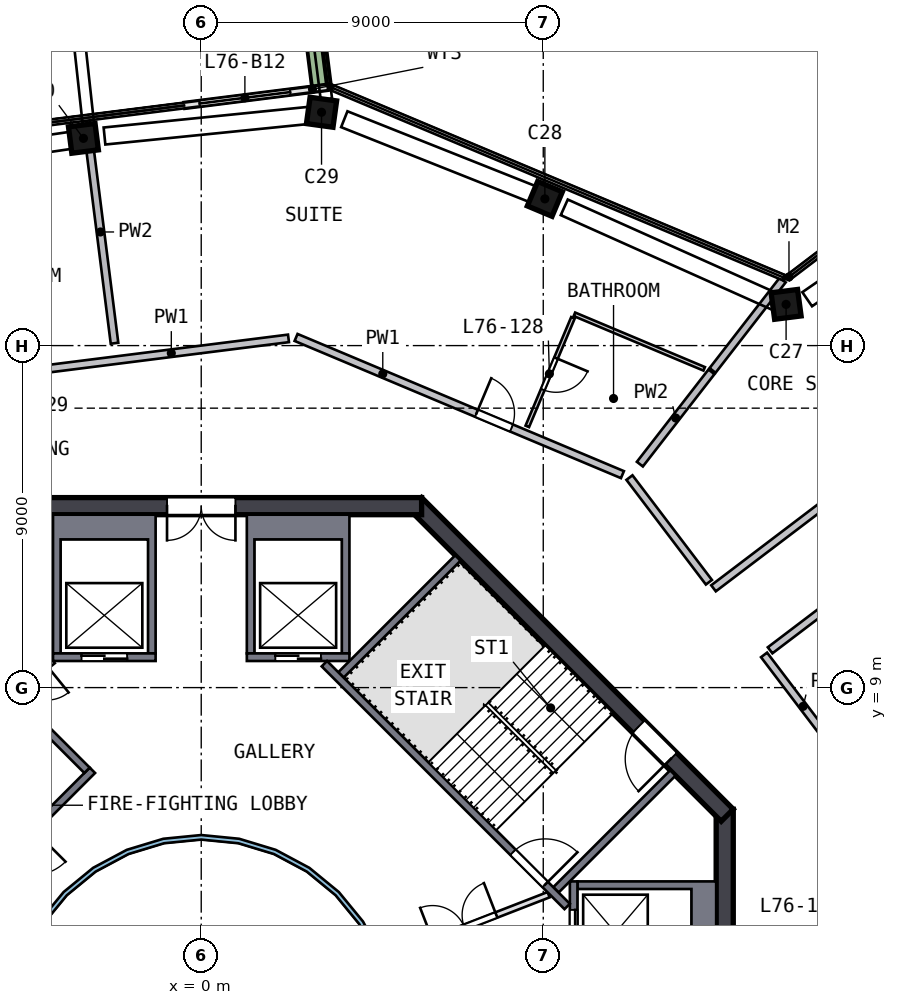
"""IFC4 building model, lengths in metres.
Left out: names, types, materials, properties, quantities, classifications, styles, units other than length and angle.
Written with IfcOpenShell. Run it as: python <this file> out.ifc"""

import sys

from ifc_helpers import new_model, si_unit, direction, frame, frame_2d, origin, origin_2d, place, context, subcontext, project, spatial, polyline, rectangle, outline, extrude, element, fill, save


model = new_model("IFC4")
c1 = context("Model", 3, precision=1e-05, world=origin(), true_north=direction((0.0, 1.0)))
c2 = subcontext(c1, "Body", "Model", "MODEL_VIEW")
j1 = project(units=[si_unit("LENGTHUNIT", "METRE"), si_unit("PLANEANGLEUNIT", "RADIAN")], contexts=[c1])
p1 = place(None, origin())
s1 = spatial("IfcSite", under=j1, at=p1, CompositionType="ELEMENT")
p2 = place(p1, origin())
s2 = spatial("IfcBuilding", under=s1, at=p2, CompositionType="ELEMENT")
p3 = place(p2, frame((0.0, 0.0, 306.5)))
s3 = spatial("IfcBuildingStorey", under=s2, at=p3, CompositionType="ELEMENT", Elevation=306.5)
p4 = place(p3, frame((15.5, 18.996, 0.0), z_axis=(-0.090987071, 0.072896074, 0.993180505), x_axis=(0.987921086, 0.132224112, 0.080800445)))
e1 = element("IfcColumn", 1, at=p4, inside=s3, PredefinedType="COLUMN", context=c2, shape_type="SweptSolid", body=[
    extrude(rectangle(XDim=0.7, YDim=0.7, at=origin_2d()), origin(), (0.0, 0.0, 1.0), 3.212),
])
p5 = place(p3, frame((9.168, 21.81, 0.0), z_axis=(-0.104110118, 0.042739143, 0.993647044), x_axis=(-0.915971714, 0.385137856, -0.11253733)))
e2 = element("IfcColumn", 2, at=p5, inside=s3, PredefinedType="COLUMN", context=c2, shape_type="SweptSolid", body=[
    extrude(rectangle(XDim=0.7, YDim=0.7, at=origin_2d()), origin(), (0.0, 0.0, 1.0), 3.21),
])
p6 = place(p3, frame((3.304, 24.123, 0.0), z_axis=(-0.114865555, 0.014747795, 0.993271568), x_axis=(0.984075654, -0.134849795, 0.115804315)))
e3 = element("IfcColumn", 3, at=p6, inside=s3, PredefinedType="COLUMN", context=c2, shape_type="SweptSolid", body=[
    extrude(rectangle(XDim=0.7, YDim=0.7, at=origin_2d()), origin(), (0.0, 0.0, 1.0), 3.212),
])
p7 = place(p3, frame((-2.965, 23.472, 0.0), z_axis=(-0.111562563, -0.014981476, 0.993644479), x_axis=(-0.985891755, -0.123885828, -0.112559981)))
e4 = element("IfcColumn", 4, at=p7, inside=s3, PredefinedType="COLUMN", context=c2, shape_type="SweptSolid", body=[
    extrude(rectangle(XDim=0.7, YDim=0.7, at=origin_2d()), origin(), (0.0, 0.0, 1.0), 3.21),
])
p8 = place(p3, frame((13.775, -5.799, 0.0), z_axis=(0.0, 0.0, 1.0), x_axis=(0.0, 1.0, 0.0)))
e5 = element("IfcWall", 5, at=p8, inside=s3, PredefinedType="SHEAR", context=c2, shape_type="SweptSolid", body=[
    extrude(rectangle(XDim=11.598, YDim=0.45, at=frame_2d((5.799, 0.0))), origin(), (0.0, 0.0, 1.0), 3.5),
])
p9 = place(p8, frame((4.899, 0.0, 0.0)))
e6 = element("IfcOpeningElement", 6, at=p9, cuts=e5, PredefinedType="OPENING", context=c2, shape_type="SweptSolid", body=[
    extrude(rectangle(XDim=1.8, YDim=2.1, at=frame_2d((0.9, 1.05))), frame((0.0, 0.235, 0.0), z_axis=(0.0, -1.0, 0.0), x_axis=(1.0, 0.0, 0.0)), (0.0, 0.0, 1.0), 0.47),
])
p10 = place(p3, frame((13.841, 5.64, 0.0), z_axis=(0.0, 0.0, 1.0), x_axis=(-0.707106781, 0.707106781, 0.0)))
e7 = element("IfcWall", 7, at=p10, inside=s3, PredefinedType="SHEAR", context=c2, shape_type="SweptSolid", body=[
    extrude(rectangle(XDim=11.598, YDim=0.45, at=frame_2d((5.799, 0.0))), origin(), (0.0, 0.0, 1.0), 3.5),
])
p11 = place(p10, frame((2.099, 0.0, 0.0)))
e8 = element("IfcOpeningElement", 8, at=p11, cuts=e7, PredefinedType="OPENING", context=c2, shape_type="SweptSolid", body=[
    extrude(rectangle(XDim=1.2, YDim=2.1, at=frame_2d((0.6, 1.05))), frame((0.0, 0.235, 0.0), z_axis=(0.0, -1.0, 0.0), x_axis=(1.0, 0.0, 0.0)), (0.0, 0.0, 1.0), 0.47),
])
p12 = place(p3, frame((5.799, 13.775, 0.0), z_axis=(0.0, 0.0, 1.0), x_axis=(-1.0, 0.0, 0.0)))
e9 = element("IfcWall", 9, at=p12, inside=s3, PredefinedType="SHEAR", context=c2, shape_type="SweptSolid", body=[
    extrude(rectangle(XDim=11.598, YDim=0.45, at=frame_2d((5.799, 0.0))), origin(), (0.0, 0.0, 1.0), 3.5),
])
p13 = place(p12, frame((4.899, 0.0, 0.0)))
e10 = element("IfcOpeningElement", 10, at=p13, cuts=e9, PredefinedType="OPENING", context=c2, shape_type="SweptSolid", body=[
    extrude(rectangle(XDim=1.8, YDim=2.1, at=frame_2d((0.9, 1.05))), frame((0.0, 0.235, 0.0), z_axis=(0.0, -1.0, 0.0), x_axis=(1.0, 0.0, 0.0)), (0.0, 0.0, 1.0), 0.47),
])
p14 = place(p3, frame((3.318, 24.795, 0.0), z_axis=(0.0, 0.0, 1.0), x_axis=(-0.992114352, -0.125335996, 0.0)))
e11 = element("IfcWall", 11, at=p14, inside=s3, PredefinedType="SOLIDWALL", context=c2, shape_type="SweptSolid", body=[
    extrude(rectangle(XDim=3.787, YDim=0.15, at=frame_2d((1.893, 0.0))), origin(), (0.0, 0.0, 1.0), 2.525),
])
p15 = place(p14, frame((0.987, 0.0, 0.0)))
e12 = element("IfcOpeningElement", 12, at=p15, cuts=e11, PredefinedType="OPENING", context=c2, shape_type="SweptSolid", body=[
    extrude(rectangle(XDim=2.4, YDim=2.4, at=frame_2d((1.2, 1.2))), frame((0.0, 0.085, 0.0), z_axis=(0.0, -1.0, 0.0), x_axis=(1.0, 0.0, 0.0)), (0.0, 0.0, 1.0), 0.17),
])
p16 = place(p3, frame((3.16, 24.851, 0.0), z_axis=(0.0, 0.0, 1.0), x_axis=(-0.125312056, 0.992117376, 0.0)))
e13 = element("IfcWall", 13, at=p16, inside=s3, PredefinedType="SOLIDWALL", context=c2, shape_type="SweptSolid", body=[
    extrude(rectangle(XDim=3.199, YDim=0.5, at=frame_2d((1.6, 0.0))), origin(), (0.0, 0.0, 1.0), 0.7),
])
p17 = place(p3, origin())
e14 = element("IfcWall", 14, at=p17, inside=s3, PredefinedType="SOLIDWALL", context=c2, shape_type="SweptSolid", body=[
    extrude(outline(polyline([(13.55, 3.9), (13.55, 1.2), (9.9, 1.2), (9.9, 1.4), (12.9, 1.4), (12.9, 3.7), (9.9, 3.7), (9.9, 3.9), (13.55, 3.9)])), origin(), (0.0, 0.0, 1.0), 3.19),
])
p18 = place(p3, frame((9.8, 1.2, 0.0), z_axis=(0.0, 0.0, 1.0), x_axis=(0.0, 1.0, 0.0)))
e15 = element("IfcWall", 15, at=p18, inside=s3, PredefinedType="SOLIDWALL", context=c2, shape_type="SweptSolid", body=[
    extrude(rectangle(XDim=2.7, YDim=0.2, at=frame_2d((1.35, 0.0))), origin(), (0.0, 0.0, 1.0), 3.19),
])
p19 = place(p18, frame((0.75, 0.0, 0.0)))
e16 = element("IfcOpeningElement", 16, at=p19, cuts=e15, PredefinedType="OPENING", context=c2, shape_type="SweptSolid", body=[
    extrude(rectangle(XDim=1.2, YDim=2.1, at=frame_2d((0.6, 1.05))), frame((0.0, 0.11, 0.0), z_axis=(0.0, -1.0, 0.0), x_axis=(1.0, 0.0, 0.0)), (0.0, 0.0, 1.0), 0.22),
])
p20 = place(p3, origin())
e17 = element("IfcWall", 17, at=p20, inside=s3, PredefinedType="SOLIDWALL", context=c2, shape_type="SweptSolid", body=[
    extrude(outline(polyline([(3.9, 9.9), (3.7, 9.9), (3.7, 12.9), (1.4, 12.9), (1.4, 9.9), (1.2, 9.9), (1.2, 13.55), (3.9, 13.55), (3.9, 9.9)])), origin(), (0.0, 0.0, 1.0), 3.19),
])
p21 = place(p3, frame((1.2, 9.8, 0.0), z_axis=(0.0, 0.0, 1.0), x_axis=(1.0, 0.0, 0.0)))
e18 = element("IfcWall", 18, at=p21, inside=s3, PredefinedType="SOLIDWALL", context=c2, shape_type="SweptSolid", body=[
    extrude(rectangle(XDim=2.7, YDim=0.2, at=frame_2d((1.35, 0.0))), origin(), (0.0, 0.0, 1.0), 3.19),
])
p22 = place(p21, frame((0.75, 0.0, 0.0)))
e19 = element("IfcOpeningElement", 19, at=p22, cuts=e18, PredefinedType="OPENING", context=c2, shape_type="SweptSolid", body=[
    extrude(rectangle(XDim=1.2, YDim=2.1, at=frame_2d((0.6, 1.05))), frame((0.0, 0.11, 0.0), z_axis=(0.0, -1.0, 0.0), x_axis=(1.0, 0.0, 0.0)), (0.0, 0.0, 1.0), 0.22),
])
p23 = place(p3, origin())
e20 = element("IfcWall", 20, at=p23, inside=s3, PredefinedType="SOLIDWALL", context=c2, shape_type="SweptSolid", body=[
    extrude(outline(polyline([(-3.9, 13.55), (-1.2, 13.55), (-1.2, 9.9), (-1.4, 9.9), (-1.4, 12.9), (-3.7, 12.9), (-3.7, 9.9), (-3.9, 9.9), (-3.9, 13.55)])), origin(), (0.0, 0.0, 1.0), 3.19),
])
p24 = place(p3, frame((-1.2, 9.8, 0.0), z_axis=(0.0, 0.0, 1.0), x_axis=(-1.0, 0.0, 0.0)))
e21 = element("IfcWall", 21, at=p24, inside=s3, PredefinedType="SOLIDWALL", context=c2, shape_type="SweptSolid", body=[
    extrude(rectangle(XDim=2.7, YDim=0.2, at=frame_2d((1.35, 0.0))), origin(), (0.0, 0.0, 1.0), 3.19),
])
p25 = place(p24, frame((0.75, 0.0, 0.0)))
e22 = element("IfcOpeningElement", 22, at=p25, cuts=e21, PredefinedType="OPENING", context=c2, shape_type="SweptSolid", body=[
    extrude(rectangle(XDim=1.2, YDim=2.1, at=frame_2d((0.6, 1.05))), frame((0.0, 0.11, 0.0), z_axis=(0.0, -1.0, 0.0), x_axis=(1.0, 0.0, 0.0)), (0.0, 0.0, 1.0), 0.22),
])
p26 = place(p3, frame((3.24, 9.629, 0.0), z_axis=(0.0, 0.0, 1.0), x_axis=(0.707106781, -0.707106781, 0.0)))
e23 = element("IfcWall", 23, at=p26, inside=s3, PredefinedType="SOLIDWALL", context=c2, shape_type="SweptSolid", body=[
    extrude(rectangle(XDim=9.036, YDim=0.2, at=frame_2d((4.518, 0.0))), origin(), (0.0, 0.0, 1.0), 3.19),
])
p27 = place(p26, frame((7.018, 0.0, 0.0)))
e24 = element("IfcOpeningElement", 24, at=p27, cuts=e23, PredefinedType="OPENING", context=c2, shape_type="SweptSolid", body=[
    extrude(rectangle(XDim=1.2, YDim=2.1, at=frame_2d((0.6, 1.05))), frame((0.0, 0.11, 0.0), z_axis=(0.0, -1.0, 0.0), x_axis=(1.0, 0.0, 0.0)), (0.0, 0.0, 1.0), 0.22),
])
for number, where, z_axis, x_axis in (
    (25, (9.334, 3.677, 0.0), (0.0, 0.0, 1.0), (0.707, 0.707, 0.0)),
    (26, (3.677, 9.334, 0.0), (0.0, 0.0, 1.0), (0.707, 0.707, 0.0)),
):
    element("IfcWall", number, at=place(p3, frame(where, z_axis=z_axis, x_axis=x_axis)), inside=s3, PredefinedType="SOLIDWALL", context=c2, shape_type="SweptSolid", body=[
        extrude(rectangle(XDim=4.35, YDim=0.2, at=frame_2d((2.175, 0.0))), origin(), (0.0, 0.0, 1.0), 3.19),
    ])
p28 = place(p3, frame((-2.864, 6.823, 0.0), z_axis=(0.0, 0.0, 1.0), x_axis=(-0.707106781, -0.707106781, 0.0)))
e27 = element("IfcWall", 27, at=p28, inside=s3, PredefinedType="SOLIDWALL", context=c2, shape_type="SweptSolid", body=[
    extrude(rectangle(XDim=5.6, YDim=0.2, at=frame_2d((2.8, 0.0))), origin(), (0.0, 0.0, 1.0), 3.19),
])
p29 = place(p28, frame((2.2, 0.0, 0.0)))
e28 = element("IfcOpeningElement", 28, at=p29, cuts=e27, PredefinedType="OPENING", context=c2, shape_type="SweptSolid", body=[
    extrude(rectangle(XDim=1.2, YDim=2.1, at=frame_2d((0.6, 1.05))), frame((0.0, 0.11, 0.0), z_axis=(0.0, -1.0, 0.0), x_axis=(1.0, 0.0, 0.0)), (0.0, 0.0, 1.0), 0.22),
])
p30 = place(p3, frame((-3.005, 6.823, 0.0), z_axis=(0.0, 0.0, 1.0), x_axis=(-0.707106781, 0.707106781, 0.0)))
e29 = element("IfcWall", 29, at=p30, inside=s3, PredefinedType="SOLIDWALL", context=c2, shape_type="SweptSolid", body=[
    extrude(rectangle(XDim=2.8, YDim=0.2, at=frame_2d((1.4, 0.0))), origin(), (0.0, 0.0, 1.0), 3.19),
])
p31 = place(p3, frame((-3.9, 9.7, 0.0), z_axis=(0.0, 0.0, 1.0), x_axis=(-0.775559878, -0.631274009, 0.0)))
e30 = element("IfcWall", 30, at=p31, inside=s3, PredefinedType="PARTITIONING", context=c2, shape_type="SweptSolid", body=[
    extrude(rectangle(XDim=1.308, YDim=0.15, at=frame_2d((0.654, 0.0))), origin(), (0.0, 0.0, 1.0), 3.19),
])
p32 = place(p31, frame((0.204, 0.0, 0.0)))
e31 = element("IfcOpeningElement", 31, at=p32, cuts=e30, PredefinedType="OPENING", context=c2, shape_type="SweptSolid", body=[
    extrude(rectangle(XDim=0.9, YDim=2.1, at=frame_2d((0.45, 1.05))), frame((0.0, 0.085, 0.0), z_axis=(0.0, -1.0, 0.0), x_axis=(1.0, 0.0, 0.0)), (0.0, 0.0, 1.0), 0.17),
])
p33 = place(p3, frame((4.782, 1.857, 0.0), z_axis=(0.0, 0.0, 1.0), x_axis=(0.932167228, 0.36202798, 0.0)))
e32 = element("IfcWall", 32, at=p33, inside=s3, PredefinedType="PARTITIONING", context=c2, shape_type="SweptSolid", body=[
    extrude(rectangle(XDim=4.676, YDim=0.15, at=frame_2d((2.338, 0.0))), origin(), (0.0, 0.0, 1.0), 3.19),
])
p34 = place(p33, frame((1.4, 0.0, 0.0)))
e33 = element("IfcOpeningElement", 33, at=p34, cuts=e32, PredefinedType="OPENING", context=c2, shape_type="SweptSolid", body=[
    extrude(rectangle(XDim=1.8, YDim=2.1, at=frame_2d((0.9, 1.05))), frame((0.0, 0.085, 0.0), z_axis=(0.0, -1.0, 0.0), x_axis=(1.0, 0.0, 0.0)), (0.0, 0.0, 1.0), 0.17),
])
p35 = place(p3, origin())
e34 = element("IfcWall", 34, at=p35, inside=s3, PredefinedType="SOLIDWALL", context=c2, shape_type="SweptSolid", body=[
    extrude(outline(polyline([(5.021, -0.999), (4.73, -1.959), (4.257, -2.844), (3.62, -3.62), (2.844, -4.257), (1.959, -4.73), (0.999, -5.021), (0.0, -5.12), (-0.999, -5.021), (-1.959, -4.73), (-2.844, -4.257), (-3.62, -3.62), (-4.257, -2.844), (-4.73, -1.959), (-5.021, -0.999), (-5.12, 0.0), (-5.021, 0.999), (-4.73, 1.959), (-4.257, 2.844), (-3.62, 3.62), (-2.844, 4.257), (-1.959, 4.73), (-0.999, 5.021), (0.0, 5.12), (0.999, 5.021), (1.959, 4.73), (2.844, 4.257), (3.62, 3.62), (4.257, 2.844), (4.73, 1.959), (5.021, 0.999), (5.12, 0.0), (5.021, -0.999)]), holes=[polyline([(4.904, 0.976), (4.619, 1.913), (4.157, 2.778), (3.535, 3.535), (2.778, 4.157), (1.913, 4.619), (0.976, 4.904), (0.0, 5.0), (-0.976, 4.904), (-1.913, 4.619), (-2.778, 4.157), (-3.535, 3.535), (-4.157, 2.778), (-4.619, 1.913), (-4.904, 0.976), (-5.0, 0.0), (-4.904, -0.976), (-4.619, -1.913), (-4.157, -2.778), (-3.535, -3.535), (-2.778, -4.157), (-1.913, -4.619), (-0.976, -4.904), (0.0, -5.0), (0.976, -4.904), (1.913, -4.619), (2.778, -4.157), (3.535, -3.535), (4.157, -2.778), (4.619, -1.913), (4.904, -0.976), (5.0, 0.0), (4.904, 0.976)])]), origin(), (0.0, 0.0, 1.0), 3.19),
])
p36 = place(p3, frame((-6.947, 17.022, 0.0), z_axis=(0.0, 0.0, 1.0), x_axis=(0.992116583, 0.125318334, 0.0)))
e35 = element("IfcWall", 35, at=p36, inside=s3, PredefinedType="SOLIDWALL", context=c2, shape_type="SweptSolid", body=[
    extrude(rectangle(XDim=9.316, YDim=0.2, at=frame_2d((4.658, 0.0))), origin(), (0.0, 0.0, 1.0), 3.19),
])
p37 = place(p36, frame((1.9, 0.0, 0.0)))
e36 = element("IfcOpeningElement", 36, at=p37, cuts=e35, PredefinedType="OPENING", context=c2, shape_type="SweptSolid", body=[
    extrude(rectangle(XDim=1.0, YDim=2.1, at=frame_2d((0.5, 1.05))), frame((0.0, 0.11, 0.0), z_axis=(0.0, -1.0, 0.0), x_axis=(1.0, 0.0, 0.0)), (0.0, 0.0, 1.0), 0.22),
])
p38 = place(p3, frame((2.496, 18.215, 0.0), z_axis=(0.0, 0.0, 1.0), x_axis=(0.92185425, -0.387536761, 0.0)))
e37 = element("IfcWall", 37, at=p38, inside=s3, PredefinedType="SOLIDWALL", context=c2, shape_type="SweptSolid", body=[
    extrude(rectangle(XDim=9.316, YDim=0.2, at=frame_2d((4.658, 0.0))), origin(), (0.0, 0.0, 1.0), 3.19),
])
p39 = place(p38, frame((5.15, 0.0, 0.0)))
e38 = element("IfcOpeningElement", 38, at=p39, cuts=e37, PredefinedType="OPENING", context=c2, shape_type="SweptSolid", body=[
    extrude(rectangle(XDim=1.0, YDim=2.1, at=frame_2d((0.5, 1.05))), frame((0.0, 0.11, 0.0), z_axis=(0.0, -1.0, 0.0), x_axis=(1.0, 0.0, 0.0)), (0.0, 0.0, 1.0), 0.22),
])
p40 = place(p3, frame((13.359, 11.772, 0.0), z_axis=(0.0, 0.0, 1.0), x_axis=(-0.604542534, 0.796572862, 0.0)))
e39 = element("IfcWall", 39, at=p40, inside=s3, PredefinedType="SOLIDWALL", context=c2, shape_type="SweptSolid", body=[
    extrude(rectangle(XDim=3.458, YDim=0.2, at=frame_2d((1.729, 0.0))), origin(), (0.0, 0.0, 1.0), 3.19),
])
p41 = place(p3, frame((16.866, 7.152, 0.0), z_axis=(0.0, 0.0, 1.0), x_axis=(-0.604597052, 0.796531484, 0.0)))
e40 = element("IfcWall", 40, at=p41, inside=s3, PredefinedType="SOLIDWALL", context=c2, shape_type="SweptSolid", body=[
    extrude(rectangle(XDim=3.4, YDim=0.2, at=frame_2d((1.7, 0.0))), origin(), (0.0, 0.0, 1.0), 3.19),
])
p42 = place(p3, frame((13.48, 11.613, 0.0), z_axis=(0.0, 0.0, 1.0), x_axis=(0.796526733, 0.604603311, 0.0)))
e41 = element("IfcWall", 41, at=p42, inside=s3, PredefinedType="SOLIDWALL", context=c2, shape_type="SweptSolid", body=[
    extrude(rectangle(XDim=19.738, YDim=0.2, at=frame_2d((9.869, 0.0))), origin(), (0.0, 0.0, 1.0), 3.19),
])
p43 = place(p42, frame((15.15, 0.0, 0.0)))
e42 = element("IfcOpeningElement", 42, at=p43, cuts=e41, PredefinedType="OPENING", context=c2, shape_type="SweptSolid", body=[
    extrude(rectangle(XDim=1.0, YDim=2.1, at=frame_2d((0.5, 1.05))), frame((0.0, 0.11, 0.0), z_axis=(0.0, -1.0, 0.0), x_axis=(1.0, 0.0, 0.0)), (0.0, 0.0, 1.0), 0.22),
])
p44 = place(p3, frame((30.531, 21.794, 0.0), z_axis=(0.0, 0.0, 1.0), x_axis=(-0.796528783, -0.60460061, 0.0)))
e43 = element("IfcWall", 43, at=p44, inside=s3, PredefinedType="SOLIDWALL", context=c2, shape_type="SweptSolid", body=[
    extrude(rectangle(XDim=19.537, YDim=0.2, at=frame_2d((9.769, 0.0))), origin(), (0.0, 0.0, 1.0), 3.19),
])
p45 = place(p44, frame((2.1, 0.0, 0.0)))
e44 = element("IfcOpeningElement", 44, at=p45, cuts=e43, PredefinedType="OPENING", context=c2, shape_type="SweptSolid", body=[
    extrude(rectangle(XDim=1.0, YDim=2.1, at=frame_2d((0.5, 1.05))), frame((0.0, 0.11, 0.0), z_axis=(0.0, -1.0, 0.0), x_axis=(1.0, 0.0, 0.0)), (0.0, 0.0, 1.0), 0.22),
])
p46 = place(p3, frame((-2.282, 18.062, 0.0), z_axis=(0.0, 0.0, 1.0), x_axis=(-0.125322535, 0.992116053, 0.0)))
e45 = element("IfcWall", 45, at=p46, inside=s3, PredefinedType="SOLIDWALL", context=c2, shape_type="SweptSolid", body=[
    extrude(rectangle(XDim=5.903, YDim=0.2, at=frame_2d((2.951, 0.0))), origin(), (0.0, 0.0, 1.0), 3.19),
])
p47 = place(p3, frame((11.542, 14.88, 0.0), z_axis=(0.0, 0.0, 1.0), x_axis=(0.612879169, 0.790176641, 0.0)))
e46 = element("IfcWall", 46, at=p47, inside=s3, PredefinedType="SOLIDWALL", context=c2, shape_type="SweptSolid", body=[
    extrude(rectangle(XDim=3.075, YDim=0.2, at=frame_2d((1.538, 0.0))), origin(), (0.0, 0.0, 1.0), 3.19),
])
p48 = place(p3, frame((13.455, 17.346, 0.0), z_axis=(0.0, 0.0, 1.0), x_axis=(0.612879307, 0.790176534, 0.0)))
e47 = element("IfcWall", 47, at=p48, inside=s3, PredefinedType="SOLIDWALL", context=c2, shape_type="SweptSolid", body=[
    extrude(rectangle(XDim=3.011, YDim=0.2, at=frame_2d((1.506, 0.0))), origin(), (0.0, 0.0, 1.0), 3.19),
])
p49 = place(p3, frame((9.781, 18.731, 0.0), z_axis=(0.0, 0.0, 1.0), x_axis=(-0.3875605, -0.92184427, 0.0)))
e48 = element("IfcWall", 48, at=p49, inside=s3, PredefinedType="PARTITIONING", context=c2, shape_type="SweptSolid", body=[
    extrude(rectangle(XDim=3.1, YDim=0.1, at=frame_2d((1.55, 0.0))), origin(), (0.0, 0.0, 1.0), 3.19),
])
p50 = place(p49, frame((1.15, 0.0, 0.0)))
e49 = element("IfcOpeningElement", 49, at=p50, cuts=e48, PredefinedType="OPENING", context=c2, shape_type="SweptSolid", body=[
    extrude(rectangle(XDim=0.9, YDim=2.1, at=frame_2d((0.45, 1.05))), frame((0.0, 0.06, 0.0), z_axis=(0.0, -1.0, 0.0), x_axis=(1.0, 0.0, 0.0)), (0.0, 0.0, 1.0), 0.12),
])
p51 = place(p3, frame((9.82, 18.824, 0.0), z_axis=(0.0, 0.0, 1.0), x_axis=(0.921867226, -0.387505893, 0.0)))
e50 = element("IfcWall", 50, at=p51, inside=s3, PredefinedType="PARTITIONING", context=c2, shape_type="SweptSolid", body=[
    extrude(rectangle(XDim=3.704, YDim=0.1, at=frame_2d((1.852, 0.0))), origin(), (0.0, 0.0, 1.0), 3.19),
])
p52 = place(p15, origin())
e51 = element("IfcDoor", 51, at=p52, inside=s3, OperationType="SLIDING_TO_LEFT", PredefinedType="DOOR", context=c2, shape_type="SweptSolid", body=[
    extrude(rectangle(XDim=2.4, YDim=2.4, at=frame_2d((1.2, 1.2))), frame((0.0, 0.025, 0.0), z_axis=(0.0, -1.0, 0.0), x_axis=(1.0, 0.0, 0.0)), (0.0, 0.0, 1.0), 0.05),
])
fill(e12, e51)
p53 = place(p19, origin())
e52 = element("IfcDoor", 52, at=p53, inside=s3, OperationType="DOUBLE_DOOR_SLIDING", PredefinedType="DOOR", context=c2, shape_type="SweptSolid", body=[
    extrude(rectangle(XDim=1.2, YDim=2.1, at=frame_2d((0.6, 1.05))), frame((0.0, 0.025, 0.0), z_axis=(0.0, -1.0, 0.0), x_axis=(1.0, 0.0, 0.0)), (0.0, 0.0, 1.0), 0.05),
])
fill(e16, e52)
p54 = place(p22, origin())
e53 = element("IfcDoor", 53, at=p54, inside=s3, OperationType="DOUBLE_DOOR_SLIDING", PredefinedType="DOOR", context=c2, shape_type="SweptSolid", body=[
    extrude(rectangle(XDim=1.2, YDim=2.1, at=frame_2d((0.6, 1.05))), frame((0.0, 0.025, 0.0), z_axis=(0.0, -1.0, 0.0), x_axis=(1.0, 0.0, 0.0)), (0.0, 0.0, 1.0), 0.05),
])
fill(e19, e53)
p55 = place(p25, origin())
e54 = element("IfcDoor", 54, at=p55, inside=s3, OperationType="DOUBLE_DOOR_SLIDING", PredefinedType="DOOR", context=c2, shape_type="SweptSolid", body=[
    extrude(rectangle(XDim=1.2, YDim=2.1, at=frame_2d((0.6, 1.05))), frame((0.0, 0.025, 0.0), z_axis=(0.0, -1.0, 0.0), x_axis=(1.0, 0.0, 0.0)), (0.0, 0.0, 1.0), 0.05),
])
fill(e22, e54)
p56 = place(p27, origin())
e55 = element("IfcDoor", 55, at=p56, inside=s3, OperationType="SINGLE_SWING_RIGHT", PredefinedType="DOOR", context=c2, shape_type="SweptSolid", body=[
    extrude(rectangle(XDim=1.2, YDim=2.1, at=frame_2d((0.6, 1.05))), frame((0.0, 0.025, 0.0), z_axis=(0.0, -1.0, 0.0), x_axis=(1.0, 0.0, 0.0)), (0.0, 0.0, 1.0), 0.05),
])
fill(e24, e55)
p57 = place(p13, origin())
e56 = element("IfcDoor", 56, at=p57, inside=s3, OperationType="DOUBLE_DOOR_SINGLE_SWING", PredefinedType="DOOR", context=c2, shape_type="SweptSolid", body=[
    extrude(rectangle(XDim=1.8, YDim=2.1, at=frame_2d((0.9, 1.05))), frame((0.0, 0.025, 0.0), z_axis=(0.0, -1.0, 0.0), x_axis=(1.0, 0.0, 0.0)), (0.0, 0.0, 1.0), 0.05),
])
fill(e10, e56)
p58 = place(p11, origin())
e57 = element("IfcDoor", 57, at=p58, inside=s3, OperationType="SINGLE_SWING_LEFT", PredefinedType="DOOR", context=c2, shape_type="SweptSolid", body=[
    extrude(rectangle(XDim=1.2, YDim=2.1, at=frame_2d((0.6, 1.05))), frame((0.0, 0.025, 0.0), z_axis=(0.0, -1.0, 0.0), x_axis=(1.0, 0.0, 0.0)), (0.0, 0.0, 1.0), 0.05),
])
fill(e8, e57)
p59 = place(p34, origin())
e58 = element("IfcDoor", 58, at=p59, inside=s3, OperationType="DOUBLE_DOOR_SINGLE_SWING", PredefinedType="DOOR", context=c2, shape_type="SweptSolid", body=[
    extrude(rectangle(XDim=1.8, YDim=2.1, at=frame_2d((0.9, 1.05))), frame((0.0, 0.025, 0.0), z_axis=(0.0, -1.0, 0.0), x_axis=(1.0, 0.0, 0.0)), (0.0, 0.0, 1.0), 0.05),
])
fill(e33, e58)
p60 = place(p39, origin())
e59 = element("IfcDoor", 59, at=p60, inside=s3, OperationType="SINGLE_SWING_LEFT", PredefinedType="DOOR", context=c2, shape_type="SweptSolid", body=[
    extrude(rectangle(XDim=1.0, YDim=2.1, at=frame_2d((0.5, 1.05))), frame((0.0, 0.025, 0.0), z_axis=(0.0, -1.0, 0.0), x_axis=(1.0, 0.0, 0.0)), (0.0, 0.0, 1.0), 0.05),
])
fill(e38, e59)
p61 = place(p50, origin())
e60 = element("IfcDoor", 60, at=p61, inside=s3, OperationType="SINGLE_SWING_LEFT", PredefinedType="DOOR", context=c2, shape_type="SweptSolid", body=[
    extrude(rectangle(XDim=0.9, YDim=2.1, at=frame_2d((0.45, 1.05))), frame((0.0, 0.025, 0.0), z_axis=(0.0, -1.0, 0.0), x_axis=(1.0, 0.0, 0.0)), (0.0, 0.0, 1.0), 0.05),
])
fill(e49, e60)
save(model, sys.argv[1])
